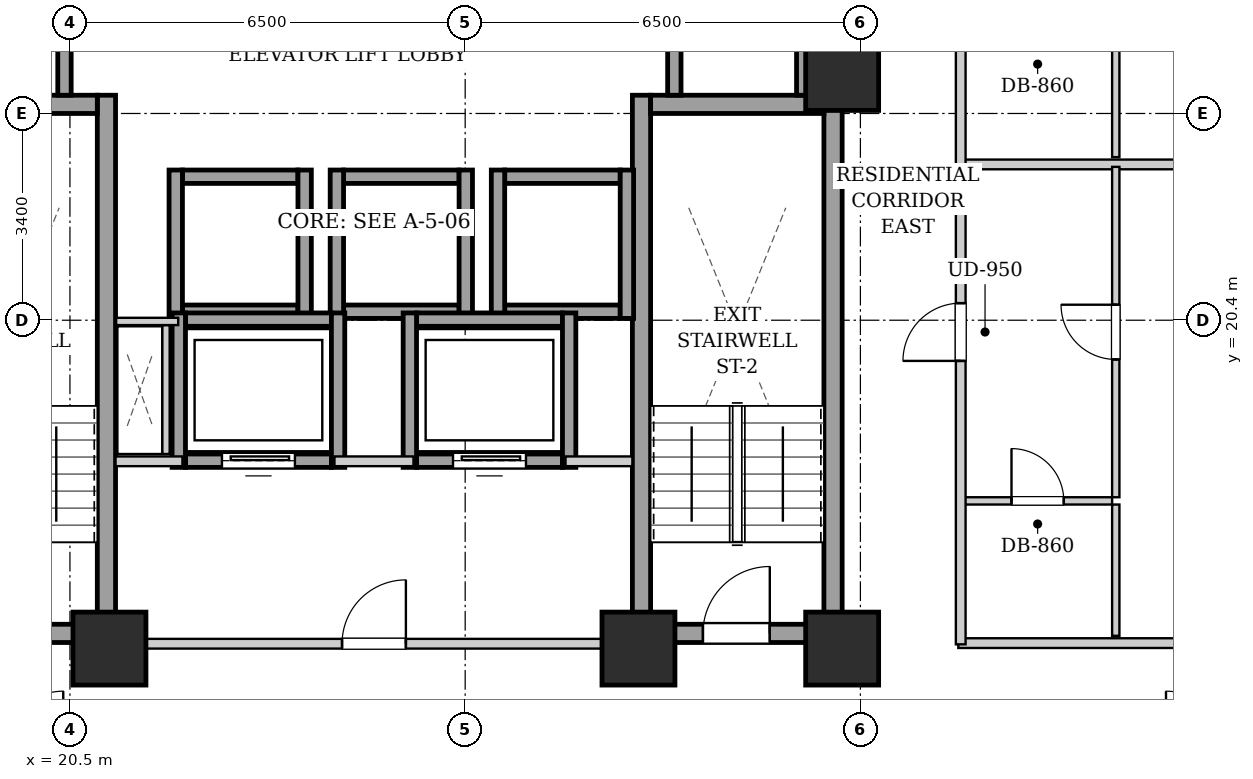
"""IFC4 building model, lengths in metres.
Left out: names, types, materials, properties, quantities, classifications, styles, units other than length and angle.
Written with IfcOpenShell. Run it as: python <this file> out.ifc"""

import sys

from ifc_helpers import new_model, si_unit, direction, frame, frame_2d, origin, origin_2d, place, context, subcontext, project, spatial, rectangle, extrude, element, fill, save


model = new_model("IFC4")
c1 = context("Model", 3, precision=1e-05, world=origin(), true_north=direction((0.0, 1.0)))
c2 = subcontext(c1, "Body", "Model", "MODEL_VIEW")
j1 = project(units=[si_unit("LENGTHUNIT", "METRE"), si_unit("PLANEANGLEUNIT", "RADIAN")], contexts=[c1])
p1 = place(None, origin())
s1 = spatial("IfcSite", under=j1, at=p1, CompositionType="ELEMENT")
p2 = place(p1, origin())
s2 = spatial("IfcBuilding", under=s1, at=p2, CompositionType="ELEMENT")
p3 = place(p2, frame((0.0, 0.0, 51.4)))
s3 = spatial("IfcBuildingStorey", under=s2, at=p3, CompositionType="ELEMENT", Elevation=51.4)
for number, where, z_axis, x_axis in (
    (1, (21.15, 15.0, 0.0), (0.0, 0.0, 1.0), (1.0, 0.0, 0.0)),
    (2, (29.85, 15.0, 0.0), (0.0, 0.0, 1.0), (1.0, 0.0, 0.0)),
    (3, (33.2, 15.0, 0.0), (0.0, 0.0, 1.0), (1.0, 0.0, 0.0)),
    (4, (33.2, 24.45, 0.0), (0.0, 0.0, 1.0), (1.0, 0.0, 0.0)),
):
    element("IfcColumn", number, at=place(p3, frame(where, z_axis=z_axis, x_axis=x_axis)), inside=s3, PredefinedType="COLUMN", context=c2, shape_type="SweptSolid", body=[
        extrude(rectangle(XDim=1.2, YDim=1.2, at=origin_2d()), origin(), (0.0, 0.0, 1.0), 3.2),
    ])
p4 = place(p3, frame((21.1, 15.1, 0.0), z_axis=(0.0, 0.0, 1.0), x_axis=(0.0, 1.0, 0.0)))
e5 = element("IfcWall", 5, at=p4, inside=s3, PredefinedType="SHEAR", context=c2, shape_type="SweptSolid", body=[
    extrude(rectangle(XDim=9.0, YDim=0.3, at=frame_2d((4.5, 0.0))), origin(), (0.0, 0.0, 1.0), 2.94),
])
p5 = place(p3, frame((18.1, 23.95, 0.0), z_axis=(0.0, 0.0, 1.0), x_axis=(1.0, 0.0, 0.0)))
e6 = element("IfcWall", 6, at=p5, inside=s3, PredefinedType="SHEAR", context=c2, shape_type="SweptSolid", body=[
    extrude(rectangle(XDim=2.85, YDim=0.3, at=frame_2d((1.425, 0.0))), origin(), (0.0, 0.0, 1.0), 2.94),
])
p6 = place(p3, frame((18.1, 15.25, 0.0), z_axis=(0.0, 0.0, 1.0), x_axis=(1.0, 0.0, 0.0)))
e7 = element("IfcWall", 7, at=p6, inside=s3, PredefinedType="SHEAR", context=c2, shape_type="SweptSolid", body=[
    extrude(rectangle(XDim=2.85, YDim=0.3, at=frame_2d((1.425, 0.0))), origin(), (0.0, 0.0, 1.0), 2.94),
])
p7 = place(p6, frame((0.86, 0.0, 0.0)))
e8 = element("IfcOpeningElement", 8, at=p7, cuts=e7, PredefinedType="OPENING", context=c2, shape_type="SweptSolid", body=[
    extrude(rectangle(XDim=1.1, YDim=2.05, at=frame_2d((0.55, 1.025))), frame((0.0, 0.16, 0.0), z_axis=(0.0, -1.0, 0.0), x_axis=(1.0, 0.0, 0.0)), (0.0, 0.0, 1.0), 0.32),
])
for number, where, z_axis, x_axis in (
    (9, (29.9, 15.1, 0.0), (0.0, 0.0, 1.0), (0.0, 1.0, 0.0)),
    (10, (33.05, 15.1, 0.0), (0.0, 0.0, 1.0), (0.0, 1.0, 0.0)),
):
    element("IfcWall", number, at=place(p3, frame(where, z_axis=z_axis, x_axis=x_axis)), inside=s3, PredefinedType="SHEAR", context=c2, shape_type="SweptSolid", body=[
        extrude(rectangle(XDim=9.0, YDim=0.3, at=frame_2d((4.5, 0.0))), origin(), (0.0, 0.0, 1.0), 2.94),
    ])
p8 = place(p3, frame((30.05, 23.95, 0.0), z_axis=(0.0, 0.0, 1.0), x_axis=(1.0, 0.0, 0.0)))
e11 = element("IfcWall", 11, at=p8, inside=s3, PredefinedType="SHEAR", context=c2, shape_type="SweptSolid", body=[
    extrude(rectangle(XDim=2.85, YDim=0.3, at=frame_2d((1.425, 0.0))), origin(), (0.0, 0.0, 1.0), 2.94),
])
p9 = place(p3, frame((30.05, 15.25, 0.0), z_axis=(0.0, 0.0, 1.0), x_axis=(1.0, 0.0, 0.0)))
e12 = element("IfcWall", 12, at=p9, inside=s3, PredefinedType="SHEAR", context=c2, shape_type="SweptSolid", body=[
    extrude(rectangle(XDim=2.85, YDim=0.3, at=frame_2d((1.425, 0.0))), origin(), (0.0, 0.0, 1.0), 2.94),
])
p10 = place(p9, frame((0.86, 0.0, 0.0)))
e13 = element("IfcOpeningElement", 13, at=p10, cuts=e12, PredefinedType="OPENING", context=c2, shape_type="SweptSolid", body=[
    extrude(rectangle(XDim=1.1, YDim=2.05, at=frame_2d((0.55, 1.025))), frame((0.0, 0.16, 0.0), z_axis=(0.0, -1.0, 0.0), x_axis=(1.0, 0.0, 0.0)), (0.0, 0.0, 1.0), 0.32),
])
for number, where, z_axis, x_axis in (
    (14, (22.35, 20.54, 0.0), (0.0, 0.0, 1.0), (1.0, 0.0, 0.0)),
    (15, (22.35, 22.76, 0.0), (0.0, 0.0, 1.0), (1.0, 0.0, 0.0)),
):
    element("IfcWall", number, at=place(p3, frame(where, z_axis=z_axis, x_axis=x_axis)), inside=s3, PredefinedType="SHEAR", context=c2, shape_type="SweptSolid", body=[
        extrude(rectangle(XDim=1.9, YDim=0.22, at=frame_2d((0.95, 0.0))), origin(), (0.0, 0.0, 1.0), 2.94),
    ])
for number, where, z_axis, x_axis in (
    (16, (22.24, 20.43, 0.0), (0.0, 0.0, 1.0), (0.0, 1.0, 0.0)),
    (17, (24.36, 20.43, 0.0), (0.0, 0.0, 1.0), (0.0, 1.0, 0.0)),
):
    element("IfcWall", number, at=place(p3, frame(where, z_axis=z_axis, x_axis=x_axis)), inside=s3, PredefinedType="SHEAR", context=c2, shape_type="SweptSolid", body=[
        extrude(rectangle(XDim=2.44, YDim=0.22, at=frame_2d((1.22, 0.0))), origin(), (0.0, 0.0, 1.0), 2.94),
    ])
for number, where, z_axis, x_axis in (
    (18, (25.0, 20.54, 0.0), (0.0, 0.0, 1.0), (1.0, 0.0, 0.0)),
    (19, (25.0, 22.76, 0.0), (0.0, 0.0, 1.0), (1.0, 0.0, 0.0)),
):
    element("IfcWall", number, at=place(p3, frame(where, z_axis=z_axis, x_axis=x_axis)), inside=s3, PredefinedType="SHEAR", context=c2, shape_type="SweptSolid", body=[
        extrude(rectangle(XDim=1.9, YDim=0.22, at=frame_2d((0.95, 0.0))), origin(), (0.0, 0.0, 1.0), 2.94),
    ])
for number, where, z_axis, x_axis in (
    (20, (24.89, 20.43, 0.0), (0.0, 0.0, 1.0), (0.0, 1.0, 0.0)),
    (21, (27.01, 20.43, 0.0), (0.0, 0.0, 1.0), (0.0, 1.0, 0.0)),
):
    element("IfcWall", number, at=place(p3, frame(where, z_axis=z_axis, x_axis=x_axis)), inside=s3, PredefinedType="SHEAR", context=c2, shape_type="SweptSolid", body=[
        extrude(rectangle(XDim=2.44, YDim=0.22, at=frame_2d((1.22, 0.0))), origin(), (0.0, 0.0, 1.0), 2.94),
    ])
for number, where, z_axis, x_axis in (
    (22, (27.65, 20.54, 0.0), (0.0, 0.0, 1.0), (1.0, 0.0, 0.0)),
    (23, (27.65, 22.76, 0.0), (0.0, 0.0, 1.0), (1.0, 0.0, 0.0)),
):
    element("IfcWall", number, at=place(p3, frame(where, z_axis=z_axis, x_axis=x_axis)), inside=s3, PredefinedType="SHEAR", context=c2, shape_type="SweptSolid", body=[
        extrude(rectangle(XDim=1.9, YDim=0.22, at=frame_2d((0.95, 0.0))), origin(), (0.0, 0.0, 1.0), 2.94),
    ])
for number, where, z_axis, x_axis in (
    (24, (27.54, 20.43, 0.0), (0.0, 0.0, 1.0), (0.0, 1.0, 0.0)),
    (25, (29.66, 20.43, 0.0), (0.0, 0.0, 1.0), (0.0, 1.0, 0.0)),
):
    element("IfcWall", number, at=place(p3, frame(where, z_axis=z_axis, x_axis=x_axis)), inside=s3, PredefinedType="SHEAR", context=c2, shape_type="SweptSolid", body=[
        extrude(rectangle(XDim=2.44, YDim=0.22, at=frame_2d((1.22, 0.0))), origin(), (0.0, 0.0, 1.0), 2.94),
    ])
p11 = place(p3, frame((20.41, 24.1, 0.0), z_axis=(0.0, 0.0, 1.0), x_axis=(0.0, 1.0, 0.0)))
e26 = element("IfcWall", 26, at=p11, inside=s3, PredefinedType="SHEAR", context=c2, shape_type="SweptSolid", body=[
    extrude(rectangle(XDim=1.96, YDim=0.22, at=frame_2d((0.98, 0.0))), origin(), (0.0, 0.0, 1.0), 2.94),
])
for number, where, z_axis, x_axis in (
    (27, (30.44, 24.1, 0.0), (0.0, 0.0, 1.0), (0.0, 1.0, 0.0)),
    (28, (32.56, 24.1, 0.0), (0.0, 0.0, 1.0), (0.0, 1.0, 0.0)),
):
    element("IfcWall", number, at=place(p3, frame(where, z_axis=z_axis, x_axis=x_axis)), inside=s3, PredefinedType="SHEAR", context=c2, shape_type="SweptSolid", body=[
        extrude(rectangle(XDim=2.07, YDim=0.22, at=frame_2d((1.035, 0.0))), origin(), (0.0, 0.0, 1.0), 2.94),
    ])
p12 = place(p3, frame((22.4, 18.09, 0.0), z_axis=(0.0, 0.0, 1.0), x_axis=(1.0, 0.0, 0.0)))
e29 = element("IfcWall", 29, at=p12, inside=s3, PredefinedType="SHEAR", context=c2, shape_type="SweptSolid", body=[
    extrude(rectangle(XDim=2.4, YDim=0.22, at=frame_2d((1.2, 0.0))), origin(), (0.0, 0.0, 1.0), 2.94),
])
p13 = place(p12, frame((0.6, 0.0, 0.0)))
e30 = element("IfcOpeningElement", 30, at=p13, cuts=e29, PredefinedType="OPENING", context=c2, shape_type="SweptSolid", body=[
    extrude(rectangle(XDim=1.2, YDim=2.15, at=frame_2d((0.6, 1.075))), frame((0.0, 0.12, 0.0), z_axis=(0.0, -1.0, 0.0), x_axis=(1.0, 0.0, 0.0)), (0.0, 0.0, 1.0), 0.24),
])
p14 = place(p3, frame((22.4, 20.41, 0.0), z_axis=(0.0, 0.0, 1.0), x_axis=(1.0, 0.0, 0.0)))
e31 = element("IfcWall", 31, at=p14, inside=s3, PredefinedType="SHEAR", context=c2, shape_type="SweptSolid", body=[
    extrude(rectangle(XDim=2.4, YDim=0.22, at=frame_2d((1.2, 0.0))), origin(), (0.0, 0.0, 1.0), 2.94),
])
for number, where, z_axis, x_axis in (
    (32, (22.29, 17.98, 0.0), (0.0, 0.0, 1.0), (0.0, 1.0, 0.0)),
    (33, (24.91, 17.98, 0.0), (0.0, 0.0, 1.0), (0.0, 1.0, 0.0)),
):
    element("IfcWall", number, at=place(p3, frame(where, z_axis=z_axis, x_axis=x_axis)), inside=s3, PredefinedType="SHEAR", context=c2, shape_type="SweptSolid", body=[
        extrude(rectangle(XDim=2.54, YDim=0.22, at=frame_2d((1.27, 0.0))), origin(), (0.0, 0.0, 1.0), 2.94),
    ])
p15 = place(p3, frame((26.2, 18.09, 0.0), z_axis=(0.0, 0.0, 1.0), x_axis=(1.0, 0.0, 0.0)))
e34 = element("IfcWall", 34, at=p15, inside=s3, PredefinedType="SHEAR", context=c2, shape_type="SweptSolid", body=[
    extrude(rectangle(XDim=2.4, YDim=0.22, at=frame_2d((1.2, 0.0))), origin(), (0.0, 0.0, 1.0), 2.94),
])
p16 = place(p15, frame((0.6, 0.0, 0.0)))
e35 = element("IfcOpeningElement", 35, at=p16, cuts=e34, PredefinedType="OPENING", context=c2, shape_type="SweptSolid", body=[
    extrude(rectangle(XDim=1.2, YDim=2.15, at=frame_2d((0.6, 1.075))), frame((0.0, 0.12, 0.0), z_axis=(0.0, -1.0, 0.0), x_axis=(1.0, 0.0, 0.0)), (0.0, 0.0, 1.0), 0.24),
])
p17 = place(p3, frame((26.2, 20.41, 0.0), z_axis=(0.0, 0.0, 1.0), x_axis=(1.0, 0.0, 0.0)))
e36 = element("IfcWall", 36, at=p17, inside=s3, PredefinedType="SHEAR", context=c2, shape_type="SweptSolid", body=[
    extrude(rectangle(XDim=2.4, YDim=0.22, at=frame_2d((1.2, 0.0))), origin(), (0.0, 0.0, 1.0), 2.94),
])
for number, where, z_axis, x_axis in (
    (37, (26.09, 17.98, 0.0), (0.0, 0.0, 1.0), (0.0, 1.0, 0.0)),
    (38, (28.71, 17.98, 0.0), (0.0, 0.0, 1.0), (0.0, 1.0, 0.0)),
):
    element("IfcWall", number, at=place(p3, frame(where, z_axis=z_axis, x_axis=x_axis)), inside=s3, PredefinedType="SHEAR", context=c2, shape_type="SweptSolid", body=[
        extrude(rectangle(XDim=2.54, YDim=0.22, at=frame_2d((1.27, 0.0))), origin(), (0.0, 0.0, 1.0), 2.94),
    ])
p18 = place(p3, frame((21.25, 15.08, 0.0), z_axis=(0.0, 0.0, 1.0), x_axis=(1.0, 0.0, 0.0)))
e39 = element("IfcWall", 39, at=p18, inside=s3, PredefinedType="PARTITIONING", context=c2, shape_type="SweptSolid", body=[
    extrude(rectangle(XDim=8.5, YDim=0.16, at=frame_2d((4.25, 0.0))), origin(), (0.0, 0.0, 1.0), 2.232),
])
p19 = place(p18, frame((3.725, 0.0, 0.0)))
e40 = element("IfcOpeningElement", 40, at=p19, cuts=e39, PredefinedType="OPENING", context=c2, shape_type="SweptSolid", body=[
    extrude(rectangle(XDim=1.05, YDim=2.05, at=frame_2d((0.525, 1.025))), frame((0.0, 0.09, 0.0), z_axis=(0.0, -1.0, 0.0), x_axis=(1.0, 0.0, 0.0)), (0.0, 0.0, 1.0), 0.18),
])
p20 = place(p3, frame((21.25, 18.08, 0.0), z_axis=(0.0, 0.0, 1.0), x_axis=(1.0, 0.0, 0.0)))
e41 = element("IfcWall", 41, at=p20, inside=s3, PredefinedType="PARTITIONING", context=c2, shape_type="SweptSolid", body=[
    extrude(rectangle(XDim=1.1, YDim=0.16, at=frame_2d((0.55, 0.0))), origin(), (0.0, 0.0, 1.0), 2.94),
])
p21 = place(p3, frame((24.85, 18.08, 0.0), z_axis=(0.0, 0.0, 1.0), x_axis=(1.0, 0.0, 0.0)))
e42 = element("IfcWall", 42, at=p21, inside=s3, PredefinedType="PARTITIONING", context=c2, shape_type="SweptSolid", body=[
    extrude(rectangle(XDim=1.3, YDim=0.16, at=frame_2d((0.65, 0.0))), origin(), (0.0, 0.0, 1.0), 2.94),
])
p22 = place(p3, frame((28.65, 18.08, 0.0), z_axis=(0.0, 0.0, 1.0), x_axis=(1.0, 0.0, 0.0)))
e43 = element("IfcWall", 43, at=p22, inside=s3, PredefinedType="PARTITIONING", context=c2, shape_type="SweptSolid", body=[
    extrude(rectangle(XDim=1.1, YDim=0.16, at=frame_2d((0.55, 0.0))), origin(), (0.0, 0.0, 1.0), 2.94),
])
p23 = place(p3, frame((33.12, 24.12, 0.0), z_axis=(0.0, 0.0, 1.0), x_axis=(0.0, 1.0, 0.0)))
e44 = element("IfcWall", 44, at=p23, inside=s3, PredefinedType="PARTITIONING", context=c2, shape_type="SweptSolid", body=[
    extrude(rectangle(XDim=4.76, YDim=0.16, at=frame_2d((2.38, 0.0))), origin(), (0.0, 0.0, 1.0), 2.94),
])
p24 = place(p3, frame((22.08, 18.2, 0.0), z_axis=(0.0, 0.0, 1.0), x_axis=(0.0, 1.0, 0.0)))
e45 = element("IfcWall", 45, at=p24, inside=s3, PredefinedType="PARTITIONING", context=c2, shape_type="SweptSolid", body=[
    extrude(rectangle(XDim=2.12, YDim=0.12, at=frame_2d((1.06, 0.0))), origin(), (0.0, 0.0, 1.0), 2.94),
])
p25 = place(p3, frame((22.28, 20.38, 0.0), z_axis=(0.0, 0.0, 1.0), x_axis=(-1.0, 0.0, 0.0)))
e46 = element("IfcWall", 46, at=p25, inside=s3, PredefinedType="PARTITIONING", context=c2, shape_type="SweptSolid", body=[
    extrude(rectangle(XDim=1.02, YDim=0.12, at=frame_2d((0.51, 0.0))), origin(), (0.0, 0.0, 1.0), 2.94),
])
p26 = place(p3, frame((35.11, 15.09, 0.0), z_axis=(0.0, 0.0, 1.0), x_axis=(1.0, 0.0, 0.0)))
e47 = element("IfcWall", 47, at=p26, inside=s3, PredefinedType="PARTITIONING", context=c2, shape_type="SweptSolid", body=[
    extrude(rectangle(XDim=11.11, YDim=0.16, at=frame_2d((5.555, 0.0))), origin(), (0.0, 0.0, 1.0), 2.232),
])
p27 = place(p3, frame((35.19, 22.962, 0.0), z_axis=(0.0, 0.0, 1.0), x_axis=(1.0, 0.0, 0.0)))
e48 = element("IfcWall", 48, at=p27, inside=s3, PredefinedType="PARTITIONING", context=c2, shape_type="SweptSolid", body=[
    extrude(rectangle(XDim=11.03, YDim=0.16, at=frame_2d((5.515, 0.0))), origin(), (0.0, 0.0, 1.0), 2.94),
])
p28 = place(p3, frame((35.19, 17.429, 0.0), z_axis=(0.0, 0.0, 1.0), x_axis=(1.0, 0.0, 0.0)))
e49 = element("IfcWall", 49, at=p28, inside=s3, PredefinedType="PARTITIONING", context=c2, shape_type="SweptSolid", body=[
    extrude(rectangle(XDim=2.45, YDim=0.12, at=frame_2d((1.225, 0.0))), origin(), (0.0, 0.0, 1.0), 2.94),
])
p29 = place(p28, frame((0.795, 0.0, 0.0)))
e50 = element("IfcOpeningElement", 50, at=p29, cuts=e49, PredefinedType="OPENING", context=c2, shape_type="SweptSolid", body=[
    extrude(rectangle(XDim=0.86, YDim=2.05, at=frame_2d((0.43, 1.025))), frame((0.0, 0.07, 0.0), z_axis=(0.0, -1.0, 0.0), x_axis=(1.0, 0.0, 0.0)), (0.0, 0.0, 1.0), 0.14),
])
p30 = place(p3, frame((37.7, 15.21, 0.0), z_axis=(0.0, 0.0, 1.0), x_axis=(0.0, 1.0, 0.0)))
e51 = element("IfcWall", 51, at=p30, inside=s3, PredefinedType="PARTITIONING", context=c2, shape_type="SweptSolid", body=[
    extrude(rectangle(XDim=2.159, YDim=0.12, at=frame_2d((1.08, 0.0))), origin(), (0.0, 0.0, 1.0), 2.94),
])
p31 = place(p3, frame((37.7, 17.489, 0.0), z_axis=(0.0, 0.0, 1.0), x_axis=(0.0, 1.0, 0.0)))
e52 = element("IfcWall", 52, at=p31, inside=s3, PredefinedType="PARTITIONING", context=c2, shape_type="SweptSolid", body=[
    extrude(rectangle(XDim=5.433, YDim=0.12, at=frame_2d((2.717, 0.0))), origin(), (0.0, 0.0, 1.0), 2.94),
])
p32 = place(p31, frame((2.266, 0.0, 0.0)))
e53 = element("IfcOpeningElement", 53, at=p32, cuts=e52, PredefinedType="OPENING", context=c2, shape_type="SweptSolid", body=[
    extrude(rectangle(XDim=0.9, YDim=2.05, at=frame_2d((0.45, 1.025))), frame((0.0, 0.07, 0.0), z_axis=(0.0, -1.0, 0.0), x_axis=(1.0, 0.0, 0.0)), (0.0, 0.0, 1.0), 0.14),
])
p33 = place(p3, frame((37.7, 23.082, 0.0), z_axis=(0.0, 0.0, 1.0), x_axis=(0.0, 1.0, 0.0)))
e54 = element("IfcWall", 54, at=p33, inside=s3, PredefinedType="PARTITIONING", context=c2, shape_type="SweptSolid", body=[
    extrude(rectangle(XDim=1.85, YDim=0.12, at=frame_2d((0.925, 0.0))), origin(), (0.0, 0.0, 1.0), 2.94),
])
p34 = place(p3, frame((35.15, 15.07, 0.0), z_axis=(0.0, 0.0, 1.0), x_axis=(0.0, 1.0, 0.0)))
e55 = element("IfcWall", 55, at=p34, inside=s3, PredefinedType="PARTITIONING", context=c2, shape_type="SweptSolid", body=[
    extrude(rectangle(XDim=13.93, YDim=0.16, at=frame_2d((6.965, 0.0))), origin(), (0.0, 0.0, 1.0), 2.94),
])
p35 = place(p34, frame((4.661, 0.0, 0.0)))
e56 = element("IfcOpeningElement", 56, at=p35, cuts=e55, PredefinedType="OPENING", context=c2, shape_type="SweptSolid", body=[
    extrude(rectangle(XDim=0.95, YDim=2.1, at=frame_2d((0.475, 1.05))), frame((0.0, 0.09, 0.0), z_axis=(0.0, -1.0, 0.0), x_axis=(1.0, 0.0, 0.0)), (0.0, 0.0, 1.0), 0.18),
])
p36 = place(p34, frame((11.411, 0.0, 0.0)))
e57 = element("IfcOpeningElement", 57, at=p36, cuts=e55, PredefinedType="OPENING", context=c2, shape_type="SweptSolid", body=[
    extrude(rectangle(XDim=0.95, YDim=2.1, at=frame_2d((0.475, 1.05))), frame((0.0, 0.09, 0.0), z_axis=(0.0, -1.0, 0.0), x_axis=(1.0, 0.0, 0.0)), (0.0, 0.0, 1.0), 0.18),
])
p37 = place(p10, origin())
e58 = element("IfcDoor", 58, at=p37, inside=s3, OperationType="SINGLE_SWING_RIGHT", PredefinedType="DOOR", context=c2, shape_type="SweptSolid", body=[
    extrude(rectangle(XDim=1.1, YDim=2.05, at=frame_2d((0.55, 1.025))), frame((0.0, 0.025, 0.0), z_axis=(0.0, -1.0, 0.0), x_axis=(1.0, 0.0, 0.0)), (0.0, 0.0, 1.0), 0.05),
])
fill(e13, e58)
p38 = place(p13, origin())
e59 = element("IfcDoor", 59, at=p38, inside=s3, OperationType="SLIDING_TO_LEFT", PredefinedType="DOOR", context=c2, shape_type="SweptSolid", body=[
    extrude(rectangle(XDim=1.2, YDim=2.15, at=frame_2d((0.6, 1.075))), frame((0.0, 0.025, 0.0), z_axis=(0.0, -1.0, 0.0), x_axis=(1.0, 0.0, 0.0)), (0.0, 0.0, 1.0), 0.05),
])
fill(e30, e59)
p39 = place(p16, origin())
e60 = element("IfcDoor", 60, at=p39, inside=s3, OperationType="SLIDING_TO_LEFT", PredefinedType="DOOR", context=c2, shape_type="SweptSolid", body=[
    extrude(rectangle(XDim=1.2, YDim=2.15, at=frame_2d((0.6, 1.075))), frame((0.0, 0.025, 0.0), z_axis=(0.0, -1.0, 0.0), x_axis=(1.0, 0.0, 0.0)), (0.0, 0.0, 1.0), 0.05),
])
fill(e35, e60)
p40 = place(p19, origin())
e61 = element("IfcDoor", 61, at=p40, inside=s3, OperationType="SINGLE_SWING_RIGHT", PredefinedType="DOOR", context=c2, shape_type="SweptSolid", body=[
    extrude(rectangle(XDim=1.05, YDim=2.05, at=frame_2d((0.525, 1.025))), frame((0.0, 0.025, 0.0), z_axis=(0.0, -1.0, 0.0), x_axis=(1.0, 0.0, 0.0)), (0.0, 0.0, 1.0), 0.05),
])
fill(e40, e61)
p41 = place(p29, origin())
e62 = element("IfcDoor", 62, at=p41, inside=s3, OperationType="SINGLE_SWING_LEFT", PredefinedType="DOOR", context=c2, shape_type="SweptSolid", body=[
    extrude(rectangle(XDim=0.86, YDim=2.05, at=frame_2d((0.43, 1.025))), frame((0.0, 0.025, 0.0), z_axis=(0.0, -1.0, 0.0), x_axis=(1.0, 0.0, 0.0)), (0.0, 0.0, 1.0), 0.05),
])
fill(e50, e62)
p42 = place(p32, origin())
e63 = element("IfcDoor", 63, at=p42, inside=s3, OperationType="SINGLE_SWING_RIGHT", PredefinedType="DOOR", context=c2, shape_type="SweptSolid", body=[
    extrude(rectangle(XDim=0.9, YDim=2.05, at=frame_2d((0.45, 1.025))), frame((0.0, 0.025, 0.0), z_axis=(0.0, -1.0, 0.0), x_axis=(1.0, 0.0, 0.0)), (0.0, 0.0, 1.0), 0.05),
])
fill(e53, e63)
p43 = place(p35, origin())
e64 = element("IfcDoor", 64, at=p43, inside=s3, OperationType="SINGLE_SWING_LEFT", PredefinedType="DOOR", context=c2, shape_type="SweptSolid", body=[
    extrude(rectangle(XDim=0.95, YDim=2.1, at=frame_2d((0.475, 1.05))), frame((0.0, 0.025, 0.0), z_axis=(0.0, -1.0, 0.0), x_axis=(1.0, 0.0, 0.0)), (0.0, 0.0, 1.0), 0.05),
])
fill(e56, e64)
save(model, sys.argv[1])
